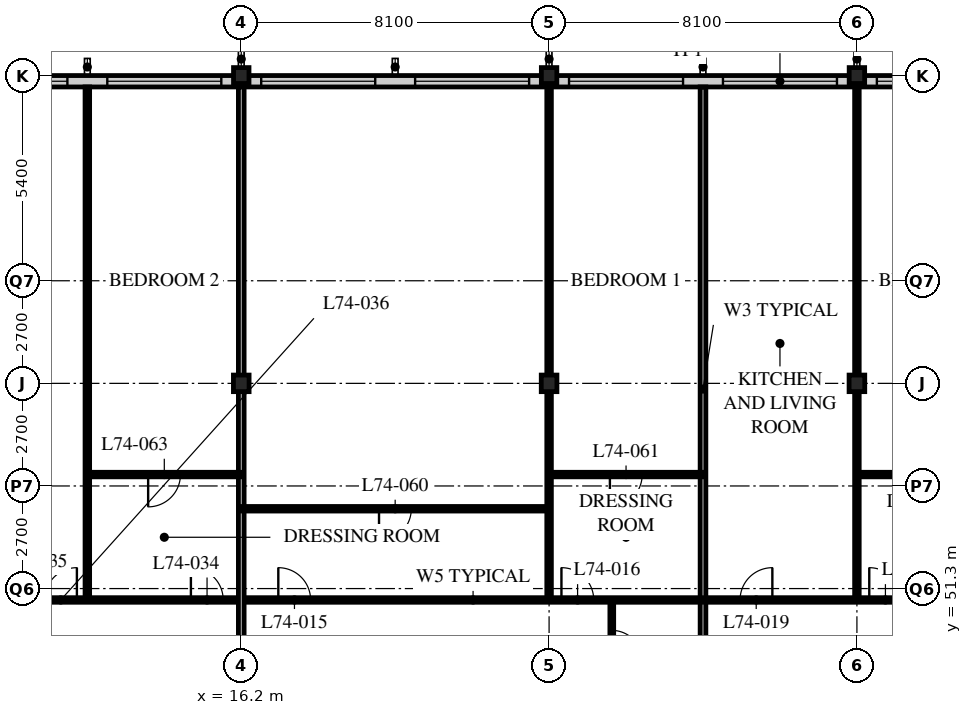
"""IFC4 building model, lengths in metres.
Left out: names, types, materials, properties, quantities, classifications, styles, units other than length and angle.
Written with IfcOpenShell. Run it as: python <this file> out.ifc"""

import sys

from ifc_helpers import new_model, si_unit, direction, frame, frame_2d, origin, origin_2d, place, context, subcontext, project, spatial, rectangle, i_section, extrude, element, fill, save


model = new_model("IFC4")
c1 = context("Model", 3, precision=1e-05, world=origin(), true_north=direction((0.0, 1.0)))
c2 = subcontext(c1, "Body", "Model", "MODEL_VIEW")
j1 = project(units=[si_unit("LENGTHUNIT", "METRE"), si_unit("PLANEANGLEUNIT", "RADIAN")], contexts=[c1])
p1 = place(None, origin())
s1 = spatial("IfcSite", under=j1, at=p1, CompositionType="ELEMENT")
p2 = place(p1, origin())
s2 = spatial("IfcBuilding", under=s1, at=p2, CompositionType="ELEMENT")
p3 = place(p2, frame((0.0, 0.0, 289.2)))
s3 = spatial("IfcBuildingStorey", under=s2, at=p3, CompositionType="ELEMENT", Elevation=289.2)
p4 = place(p3, frame((16.2, 56.7, 0.0), z_axis=(0.0, 0.0, 1.0), x_axis=(1.0, 0.0, 0.0)))
e1 = element("IfcColumn", 1, at=p4, inside=s3, PredefinedType="COLUMN", context=c2, shape_type="SweptSolid", body=[
    extrude(i_section(OverallWidth=0.412, OverallDepth=0.437, WebThickness=0.036, FlangeThickness=0.058, FilletRadius=0.015, at=origin_2d()), origin(), (0.0, 0.0, 1.0), 3.9),
])
p5 = place(p3, frame((16.2, 64.8, 0.0), z_axis=(0.0, 0.0, 1.0), x_axis=(1.0, 0.0, 0.0)))
e2 = element("IfcColumn", 2, at=p5, inside=s3, PredefinedType="COLUMN", context=c2, shape_type="SweptSolid", body=[
    extrude(i_section(OverallWidth=0.407, OverallDepth=0.419, WebThickness=0.031, FlangeThickness=0.049, FilletRadius=0.015, at=origin_2d()), origin(), (0.0, 0.0, 1.0), 3.9),
])
p6 = place(p3, frame((24.3, 56.7, 0.0), z_axis=(0.0, 0.0, 1.0), x_axis=(1.0, 0.0, 0.0)))
e3 = element("IfcColumn", 3, at=p6, inside=s3, PredefinedType="COLUMN", context=c2, shape_type="SweptSolid", body=[
    extrude(i_section(OverallWidth=0.412, OverallDepth=0.437, WebThickness=0.036, FlangeThickness=0.058, FilletRadius=0.015, at=origin_2d()), origin(), (0.0, 0.0, 1.0), 3.9),
])
p7 = place(p3, frame((24.3, 64.8, 0.0), z_axis=(0.0, 0.0, 1.0), x_axis=(1.0, 0.0, 0.0)))
e4 = element("IfcColumn", 4, at=p7, inside=s3, PredefinedType="COLUMN", context=c2, shape_type="SweptSolid", body=[
    extrude(i_section(OverallWidth=0.407, OverallDepth=0.419, WebThickness=0.031, FlangeThickness=0.049, FilletRadius=0.015, at=origin_2d()), origin(), (0.0, 0.0, 1.0), 3.9),
])
p8 = place(p3, frame((32.4, 56.7, 0.0), z_axis=(0.0, 0.0, 1.0), x_axis=(1.0, 0.0, 0.0)))
e5 = element("IfcColumn", 5, at=p8, inside=s3, PredefinedType="COLUMN", context=c2, shape_type="SweptSolid", body=[
    extrude(i_section(OverallWidth=0.412, OverallDepth=0.437, WebThickness=0.036, FlangeThickness=0.058, FilletRadius=0.015, at=origin_2d()), origin(), (0.0, 0.0, 1.0), 3.9),
])
p9 = place(p3, frame((32.4, 64.8, 0.0), z_axis=(0.0, 0.0, 1.0), x_axis=(1.0, 0.0, 0.0)))
e6 = element("IfcColumn", 6, at=p9, inside=s3, PredefinedType="COLUMN", context=c2, shape_type="SweptSolid", body=[
    extrude(i_section(OverallWidth=0.407, OverallDepth=0.419, WebThickness=0.031, FlangeThickness=0.049, FilletRadius=0.015, at=origin_2d()), origin(), (0.0, 0.0, 1.0), 3.9),
])
p10 = place(p3, frame((48.3, 64.65, 0.0), z_axis=(0.0, 0.0, 1.0), x_axis=(-1.0, 0.0, 0.0)))
e7 = element("IfcWall", 7, at=p10, inside=s3, PredefinedType="SOLIDWALL", context=c2, shape_type="SweptSolid", body=[
    extrude(rectangle(XDim=40.2, YDim=0.3, at=frame_2d((20.1, 0.0))), origin(), (0.0, 0.0, 1.0), 3.69),
])
p11 = place(p10, frame((0.225, 0.0, 0.6)))
e8 = element("IfcOpeningElement", 8, at=p11, cuts=e7, PredefinedType="OPENING", context=c2, shape_type="SweptSolid", body=[
    extrude(rectangle(XDim=3.0, YDim=2.4, at=frame_2d((1.5, 1.2))), frame((0.0, 0.16, 0.0), z_axis=(0.0, -1.0, 0.0), x_axis=(1.0, 0.0, 0.0)), (0.0, 0.0, 1.0), 0.32),
])
p12 = place(p10, frame((4.275, 0.0, 0.6)))
e9 = element("IfcOpeningElement", 9, at=p12, cuts=e7, PredefinedType="OPENING", context=c2, shape_type="SweptSolid", body=[
    extrude(rectangle(XDim=3.0, YDim=2.4, at=frame_2d((1.5, 1.2))), frame((0.0, 0.16, 0.0), z_axis=(0.0, -1.0, 0.0), x_axis=(1.0, 0.0, 0.0)), (0.0, 0.0, 1.0), 0.32),
])
p13 = place(p10, frame((8.325, 0.0, 0.6)))
e10 = element("IfcOpeningElement", 10, at=p13, cuts=e7, PredefinedType="OPENING", context=c2, shape_type="SweptSolid", body=[
    extrude(rectangle(XDim=3.0, YDim=2.4, at=frame_2d((1.5, 1.2))), frame((0.0, 0.16, 0.0), z_axis=(0.0, -1.0, 0.0), x_axis=(1.0, 0.0, 0.0)), (0.0, 0.0, 1.0), 0.32),
])
p14 = place(p10, frame((12.375, 0.0, 0.6)))
e11 = element("IfcOpeningElement", 11, at=p14, cuts=e7, PredefinedType="OPENING", context=c2, shape_type="SweptSolid", body=[
    extrude(rectangle(XDim=3.0, YDim=2.4, at=frame_2d((1.5, 1.2))), frame((0.0, 0.16, 0.0), z_axis=(0.0, -1.0, 0.0), x_axis=(1.0, 0.0, 0.0)), (0.0, 0.0, 1.0), 0.32),
])
p15 = place(p10, frame((16.425, 0.0, 0.6)))
e12 = element("IfcOpeningElement", 12, at=p15, cuts=e7, PredefinedType="OPENING", context=c2, shape_type="SweptSolid", body=[
    extrude(rectangle(XDim=3.0, YDim=2.4, at=frame_2d((1.5, 1.2))), frame((0.0, 0.16, 0.0), z_axis=(0.0, -1.0, 0.0), x_axis=(1.0, 0.0, 0.0)), (0.0, 0.0, 1.0), 0.32),
])
p16 = place(p10, frame((20.475, 0.0, 0.6)))
e13 = element("IfcOpeningElement", 13, at=p16, cuts=e7, PredefinedType="OPENING", context=c2, shape_type="SweptSolid", body=[
    extrude(rectangle(XDim=3.0, YDim=2.4, at=frame_2d((1.5, 1.2))), frame((0.0, 0.16, 0.0), z_axis=(0.0, -1.0, 0.0), x_axis=(1.0, 0.0, 0.0)), (0.0, 0.0, 1.0), 0.32),
])
p17 = place(p10, frame((24.525, 0.0, 0.6)))
e14 = element("IfcOpeningElement", 14, at=p17, cuts=e7, PredefinedType="OPENING", context=c2, shape_type="SweptSolid", body=[
    extrude(rectangle(XDim=3.0, YDim=2.4, at=frame_2d((1.5, 1.2))), frame((0.0, 0.16, 0.0), z_axis=(0.0, -1.0, 0.0), x_axis=(1.0, 0.0, 0.0)), (0.0, 0.0, 1.0), 0.32),
])
p18 = place(p10, frame((28.575, 0.0, 0.6)))
e15 = element("IfcOpeningElement", 15, at=p18, cuts=e7, PredefinedType="OPENING", context=c2, shape_type="SweptSolid", body=[
    extrude(rectangle(XDim=3.0, YDim=2.4, at=frame_2d((1.5, 1.2))), frame((0.0, 0.16, 0.0), z_axis=(0.0, -1.0, 0.0), x_axis=(1.0, 0.0, 0.0)), (0.0, 0.0, 1.0), 0.32),
])
p19 = place(p10, frame((32.625, 0.0, 0.6)))
e16 = element("IfcOpeningElement", 16, at=p19, cuts=e7, PredefinedType="OPENING", context=c2, shape_type="SweptSolid", body=[
    extrude(rectangle(XDim=3.0, YDim=2.4, at=frame_2d((1.5, 1.2))), frame((0.0, 0.16, 0.0), z_axis=(0.0, -1.0, 0.0), x_axis=(1.0, 0.0, 0.0)), (0.0, 0.0, 1.0), 0.32),
])
p20 = place(p10, frame((36.675, 0.0, 0.6)))
e17 = element("IfcOpeningElement", 17, at=p20, cuts=e7, PredefinedType="OPENING", context=c2, shape_type="SweptSolid", body=[
    extrude(rectangle(XDim=3.0, YDim=2.4, at=frame_2d((1.5, 1.2))), frame((0.0, 0.16, 0.0), z_axis=(0.0, -1.0, 0.0), x_axis=(1.0, 0.0, 0.0)), (0.0, 0.0, 1.0), 0.32),
])
p21 = place(p3, frame((25.95, 48.6, 0.0), z_axis=(0.0, 0.0, 1.0), x_axis=(0.0, 1.0, 0.0)))
e18 = element("IfcWall", 18, at=p21, inside=s3, PredefinedType="PARTITIONING", context=c2, shape_type="SweptSolid", body=[
    extrude(rectangle(XDim=2.4, YDim=0.1, at=frame_2d((1.2, 0.0))), origin(), (0.0, 0.0, 1.0), 3.69),
])
p22 = place(p21, frame((0.8, 0.0, 0.0)))
e19 = element("IfcOpeningElement", 19, at=p22, cuts=e18, PredefinedType="OPENING", context=c2, shape_type="SweptSolid", body=[
    extrude(rectangle(XDim=0.8, YDim=2.1, at=frame_2d((0.4, 1.05))), frame((0.0, 0.06, 0.0), z_axis=(0.0, -1.0, 0.0), x_axis=(1.0, 0.0, 0.0)), (0.0, 0.0, 1.0), 0.12),
])
p23 = place(p3, frame((24.3, 51.0, 0.0), z_axis=(0.0, 0.0, 1.0), x_axis=(0.0, 1.0, 0.0)))
e20 = element("IfcWall", 20, at=p23, inside=s3, PredefinedType="PARTITIONING", context=c2, shape_type="SweptSolid", body=[
    extrude(rectangle(XDim=13.5, YDim=0.12, at=frame_2d((6.75, 0.0))), origin(), (0.0, 0.0, 1.0), 3.078),
])
p24 = place(p3, frame((28.35, 48.6, 0.0), z_axis=(0.0, 0.0, 1.0), x_axis=(0.0, 1.0, 0.0)))
e21 = element("IfcWall", 21, at=p24, inside=s3, PredefinedType="PARTITIONING", context=c2, shape_type="SweptSolid", body=[
    extrude(rectangle(XDim=15.9, YDim=0.15, at=frame_2d((7.95, 0.0))), origin(), (0.0, 0.0, 1.0), 3.69),
])
p25 = place(p3, frame((32.4, 51.0, 0.0), z_axis=(0.0, 0.0, 1.0), x_axis=(0.0, 1.0, 0.0)))
e22 = element("IfcWall", 22, at=p25, inside=s3, PredefinedType="PARTITIONING", context=c2, shape_type="SweptSolid", body=[
    extrude(rectangle(XDim=13.5, YDim=0.12, at=frame_2d((6.75, 0.0))), origin(), (0.0, 0.0, 1.0), 3.078),
])
p26 = place(p3, frame((8.15, 51.0, 0.0), z_axis=(0.0, 0.0, 1.0), x_axis=(1.0, 0.0, 0.0)))
e23 = element("IfcWall", 23, at=p26, inside=s3, PredefinedType="PARTITIONING", context=c2, shape_type="SweptSolid", body=[
    extrude(rectangle(XDim=28.3, YDim=0.12, at=frame_2d((14.15, 0.0))), origin(), (0.0, 0.0, 1.0), 3.69),
])
p27 = place(p26, frame((9.025, 0.0, 0.0)))
e24 = element("IfcOpeningElement", 24, at=p27, cuts=e23, PredefinedType="OPENING", context=c2, shape_type="SweptSolid", body=[
    extrude(rectangle(XDim=0.85, YDim=2.1, at=frame_2d((0.425, 1.05))), frame((0.0, 0.07, 0.0), z_axis=(0.0, -1.0, 0.0), x_axis=(1.0, 0.0, 0.0)), (0.0, 0.0, 1.0), 0.14),
])
p28 = place(p26, frame((16.475, 0.0, 0.0)))
e25 = element("IfcOpeningElement", 25, at=p28, cuts=e23, PredefinedType="OPENING", context=c2, shape_type="SweptSolid", body=[
    extrude(rectangle(XDim=0.85, YDim=2.1, at=frame_2d((0.425, 1.05))), frame((0.0, 0.07, 0.0), z_axis=(0.0, -1.0, 0.0), x_axis=(1.0, 0.0, 0.0)), (0.0, 0.0, 1.0), 0.14),
])
p29 = place(p26, frame((21.175, 0.0, 0.0)))
e26 = element("IfcOpeningElement", 26, at=p29, cuts=e23, PredefinedType="OPENING", context=c2, shape_type="SweptSolid", body=[
    extrude(rectangle(XDim=0.85, YDim=2.1, at=frame_2d((0.425, 1.05))), frame((0.0, 0.07, 0.0), z_axis=(0.0, -1.0, 0.0), x_axis=(1.0, 0.0, 0.0)), (0.0, 0.0, 1.0), 0.14),
])
p30 = place(p26, frame((24.575, 0.0, 0.0)))
e27 = element("IfcOpeningElement", 27, at=p30, cuts=e23, PredefinedType="OPENING", context=c2, shape_type="SweptSolid", body=[
    extrude(rectangle(XDim=0.85, YDim=2.1, at=frame_2d((0.425, 1.05))), frame((0.0, 0.07, 0.0), z_axis=(0.0, -1.0, 0.0), x_axis=(1.0, 0.0, 0.0)), (0.0, 0.0, 1.0), 0.14),
])
p31 = place(p26, frame((6.725, 0.0, 0.0)))
e28 = element("IfcOpeningElement", 28, at=p31, cuts=e23, PredefinedType="OPENING", context=c2, shape_type="SweptSolid", body=[
    extrude(rectangle(XDim=0.85, YDim=2.1, at=frame_2d((0.425, 1.05))), frame((0.0, 0.07, 0.0), z_axis=(0.0, -1.0, 0.0), x_axis=(1.0, 0.0, 0.0)), (0.0, 0.0, 1.0), 0.14),
])
p32 = place(p26, frame((2.875, 0.0, 0.0)))
e29 = element("IfcOpeningElement", 29, at=p32, cuts=e23, PredefinedType="OPENING", context=c2, shape_type="SweptSolid", body=[
    extrude(rectangle(XDim=0.85, YDim=2.1, at=frame_2d((0.425, 1.05))), frame((0.0, 0.07, 0.0), z_axis=(0.0, -1.0, 0.0), x_axis=(1.0, 0.0, 0.0)), (0.0, 0.0, 1.0), 0.14),
])
p33 = place(p3, frame((12.15, 51.0, 0.0), z_axis=(0.0, 0.0, 1.0), x_axis=(0.0, 1.0, 0.0)))
e30 = element("IfcWall", 30, at=p33, inside=s3, PredefinedType="PARTITIONING", context=c2, shape_type="SweptSolid", body=[
    extrude(rectangle(XDim=13.5, YDim=0.12, at=frame_2d((6.75, 0.0))), origin(), (0.0, 0.0, 1.0), 3.69),
])
p34 = place(p3, frame((16.2, 48.6, 0.0), z_axis=(0.0, 0.0, 1.0), x_axis=(0.0, 1.0, 0.0)))
e31 = element("IfcWall", 31, at=p34, inside=s3, PredefinedType="PARTITIONING", context=c2, shape_type="SweptSolid", body=[
    extrude(rectangle(XDim=15.9, YDim=0.15, at=frame_2d((7.95, 0.0))), origin(), (0.0, 0.0, 1.0), 3.078),
])
p35 = place(p3, frame((16.2, 53.4, 0.0), z_axis=(0.0, 0.0, 1.0), x_axis=(1.0, 0.0, 0.0)))
e32 = element("IfcWall", 32, at=p35, inside=s3, PredefinedType="PARTITIONING", context=c2, shape_type="SweptSolid", body=[
    extrude(rectangle(XDim=8.1, YDim=0.12, at=frame_2d((4.05, 0.0))), origin(), (0.0, 0.0, 1.0), 3.69),
])
p36 = place(p35, frame((3.625, 0.0, 0.0)))
e33 = element("IfcOpeningElement", 33, at=p36, cuts=e32, PredefinedType="OPENING", context=c2, shape_type="SweptSolid", body=[
    extrude(rectangle(XDim=0.85, YDim=2.1, at=frame_2d((0.425, 1.05))), frame((0.0, 0.07, 0.0), z_axis=(0.0, -1.0, 0.0), x_axis=(1.0, 0.0, 0.0)), (0.0, 0.0, 1.0), 0.14),
])
p37 = place(p3, frame((24.3, 54.3, 0.0), z_axis=(0.0, 0.0, 1.0), x_axis=(1.0, 0.0, 0.0)))
e34 = element("IfcWall", 34, at=p37, inside=s3, PredefinedType="PARTITIONING", context=c2, shape_type="SweptSolid", body=[
    extrude(rectangle(XDim=4.05, YDim=0.12, at=frame_2d((2.025, 0.0))), origin(), (0.0, 0.0, 1.0), 3.69),
])
p38 = place(p37, frame((1.6, 0.0, 0.0)))
e35 = element("IfcOpeningElement", 35, at=p38, cuts=e34, PredefinedType="OPENING", context=c2, shape_type="SweptSolid", body=[
    extrude(rectangle(XDim=0.85, YDim=2.1, at=frame_2d((0.425, 1.05))), frame((0.0, 0.07, 0.0), z_axis=(0.0, -1.0, 0.0), x_axis=(1.0, 0.0, 0.0)), (0.0, 0.0, 1.0), 0.14),
])
p39 = place(p3, frame((32.4, 54.3, 0.0), z_axis=(0.0, 0.0, 1.0), x_axis=(1.0, 0.0, 0.0)))
e36 = element("IfcWall", 36, at=p39, inside=s3, PredefinedType="PARTITIONING", context=c2, shape_type="SweptSolid", body=[
    extrude(rectangle(XDim=4.05, YDim=0.12, at=frame_2d((2.025, 0.0))), origin(), (0.0, 0.0, 1.0), 3.69),
])
p40 = place(p39, frame((1.6, 0.0, 0.0)))
e37 = element("IfcOpeningElement", 37, at=p40, cuts=e36, PredefinedType="OPENING", context=c2, shape_type="SweptSolid", body=[
    extrude(rectangle(XDim=0.85, YDim=2.1, at=frame_2d((0.425, 1.05))), frame((0.0, 0.07, 0.0), z_axis=(0.0, -1.0, 0.0), x_axis=(1.0, 0.0, 0.0)), (0.0, 0.0, 1.0), 0.14),
])
p41 = place(p3, frame((12.15, 54.3, 0.0), z_axis=(0.0, 0.0, 1.0), x_axis=(1.0, 0.0, 0.0)))
e38 = element("IfcWall", 38, at=p41, inside=s3, PredefinedType="PARTITIONING", context=c2, shape_type="SweptSolid", body=[
    extrude(rectangle(XDim=4.05, YDim=0.12, at=frame_2d((2.025, 0.0))), origin(), (0.0, 0.0, 1.0), 3.69),
])
p42 = place(p41, frame((1.6, 0.0, 0.0)))
e39 = element("IfcOpeningElement", 39, at=p42, cuts=e38, PredefinedType="OPENING", context=c2, shape_type="SweptSolid", body=[
    extrude(rectangle(XDim=0.85, YDim=2.1, at=frame_2d((0.425, 1.05))), frame((0.0, 0.07, 0.0), z_axis=(0.0, -1.0, 0.0), x_axis=(1.0, 0.0, 0.0)), (0.0, 0.0, 1.0), 0.14),
])
p43 = place(p14, origin())
e40 = element("IfcWindow", 40, at=p43, inside=s3, PartitioningType="SINGLE_PANEL", PredefinedType="WINDOW", context=c2, shape_type="SweptSolid", body=[
    extrude(rectangle(XDim=3.0, YDim=2.4, at=frame_2d((1.5, 1.2))), frame((0.0, 0.03, 0.0), z_axis=(0.0, -1.0, 0.0), x_axis=(1.0, 0.0, 0.0)), (0.0, 0.0, 1.0), 0.06),
])
fill(e11, e40)
p44 = place(p15, origin())
e41 = element("IfcWindow", 41, at=p44, inside=s3, PartitioningType="SINGLE_PANEL", PredefinedType="WINDOW", context=c2, shape_type="SweptSolid", body=[
    extrude(rectangle(XDim=3.0, YDim=2.4, at=frame_2d((1.5, 1.2))), frame((0.0, 0.03, 0.0), z_axis=(0.0, -1.0, 0.0), x_axis=(1.0, 0.0, 0.0)), (0.0, 0.0, 1.0), 0.06),
])
fill(e12, e41)
p45 = place(p16, origin())
e42 = element("IfcWindow", 42, at=p45, inside=s3, PartitioningType="SINGLE_PANEL", PredefinedType="WINDOW", context=c2, shape_type="SweptSolid", body=[
    extrude(rectangle(XDim=3.0, YDim=2.4, at=frame_2d((1.5, 1.2))), frame((0.0, 0.03, 0.0), z_axis=(0.0, -1.0, 0.0), x_axis=(1.0, 0.0, 0.0)), (0.0, 0.0, 1.0), 0.06),
])
fill(e13, e42)
p46 = place(p17, origin())
e43 = element("IfcWindow", 43, at=p46, inside=s3, PartitioningType="SINGLE_PANEL", PredefinedType="WINDOW", context=c2, shape_type="SweptSolid", body=[
    extrude(rectangle(XDim=3.0, YDim=2.4, at=frame_2d((1.5, 1.2))), frame((0.0, 0.03, 0.0), z_axis=(0.0, -1.0, 0.0), x_axis=(1.0, 0.0, 0.0)), (0.0, 0.0, 1.0), 0.06),
])
fill(e14, e43)
p47 = place(p18, origin())
e44 = element("IfcWindow", 44, at=p47, inside=s3, PartitioningType="SINGLE_PANEL", PredefinedType="WINDOW", context=c2, shape_type="SweptSolid", body=[
    extrude(rectangle(XDim=3.0, YDim=2.4, at=frame_2d((1.5, 1.2))), frame((0.0, 0.03, 0.0), z_axis=(0.0, -1.0, 0.0), x_axis=(1.0, 0.0, 0.0)), (0.0, 0.0, 1.0), 0.06),
])
fill(e15, e44)
p48 = place(p19, origin())
e45 = element("IfcWindow", 45, at=p48, inside=s3, PartitioningType="SINGLE_PANEL", PredefinedType="WINDOW", context=c2, shape_type="SweptSolid", body=[
    extrude(rectangle(XDim=3.0, YDim=2.4, at=frame_2d((1.5, 1.2))), frame((0.0, 0.03, 0.0), z_axis=(0.0, -1.0, 0.0), x_axis=(1.0, 0.0, 0.0)), (0.0, 0.0, 1.0), 0.06),
])
fill(e16, e45)
p49 = place(p20, origin())
e46 = element("IfcWindow", 46, at=p49, inside=s3, PartitioningType="SINGLE_PANEL", PredefinedType="WINDOW", context=c2, shape_type="SweptSolid", body=[
    extrude(rectangle(XDim=3.0, YDim=2.4, at=frame_2d((1.5, 1.2))), frame((0.0, 0.03, 0.0), z_axis=(0.0, -1.0, 0.0), x_axis=(1.0, 0.0, 0.0)), (0.0, 0.0, 1.0), 0.06),
])
fill(e17, e46)
p50 = place(p22, origin())
e47 = element("IfcDoor", 47, at=p50, inside=s3, OperationType="SINGLE_SWING_RIGHT", PredefinedType="DOOR", context=c2, shape_type="SweptSolid", body=[
    extrude(rectangle(XDim=0.8, YDim=2.1, at=frame_2d((0.4, 1.05))), frame((0.0, 0.025, 0.0), z_axis=(0.0, -1.0, 0.0), x_axis=(1.0, 0.0, 0.0)), (0.0, 0.0, 1.0), 0.05),
])
fill(e19, e47)
p51 = place(p27, origin())
e48 = element("IfcDoor", 48, at=p51, inside=s3, OperationType="SINGLE_SWING_LEFT", PredefinedType="DOOR", context=c2, shape_type="SweptSolid", body=[
    extrude(rectangle(XDim=0.85, YDim=2.1, at=frame_2d((0.425, 1.05))), frame((0.0, 0.025, 0.0), z_axis=(0.0, -1.0, 0.0), x_axis=(1.0, 0.0, 0.0)), (0.0, 0.0, 1.0), 0.05),
])
fill(e24, e48)
p52 = place(p28, origin())
e49 = element("IfcDoor", 49, at=p52, inside=s3, OperationType="SINGLE_SWING_LEFT", PredefinedType="DOOR", context=c2, shape_type="SweptSolid", body=[
    extrude(rectangle(XDim=0.85, YDim=2.1, at=frame_2d((0.425, 1.05))), frame((0.0, 0.025, 0.0), z_axis=(0.0, -1.0, 0.0), x_axis=(1.0, 0.0, 0.0)), (0.0, 0.0, 1.0), 0.05),
])
fill(e25, e49)
p53 = place(p29, origin())
e50 = element("IfcDoor", 50, at=p53, inside=s3, OperationType="SINGLE_SWING_RIGHT", PredefinedType="DOOR", context=c2, shape_type="SweptSolid", body=[
    extrude(rectangle(XDim=0.85, YDim=2.1, at=frame_2d((0.425, 1.05))), frame((0.0, 0.025, 0.0), z_axis=(0.0, -1.0, 0.0), x_axis=(1.0, 0.0, 0.0)), (0.0, 0.0, 1.0), 0.05),
])
fill(e26, e50)
p54 = place(p30, origin())
e51 = element("IfcDoor", 51, at=p54, inside=s3, OperationType="SINGLE_SWING_LEFT", PredefinedType="DOOR", context=c2, shape_type="SweptSolid", body=[
    extrude(rectangle(XDim=0.85, YDim=2.1, at=frame_2d((0.425, 1.05))), frame((0.0, 0.025, 0.0), z_axis=(0.0, -1.0, 0.0), x_axis=(1.0, 0.0, 0.0)), (0.0, 0.0, 1.0), 0.05),
])
fill(e27, e51)
p55 = place(p31, origin())
e52 = element("IfcDoor", 52, at=p55, inside=s3, OperationType="SINGLE_SWING_LEFT", PredefinedType="DOOR", context=c2, shape_type="SweptSolid", body=[
    extrude(rectangle(XDim=0.85, YDim=2.1, at=frame_2d((0.425, 1.05))), frame((0.0, 0.025, 0.0), z_axis=(0.0, -1.0, 0.0), x_axis=(1.0, 0.0, 0.0)), (0.0, 0.0, 1.0), 0.05),
])
fill(e28, e52)
p56 = place(p32, origin())
e53 = element("IfcDoor", 53, at=p56, inside=s3, OperationType="SINGLE_SWING_RIGHT", PredefinedType="DOOR", context=c2, shape_type="SweptSolid", body=[
    extrude(rectangle(XDim=0.85, YDim=2.1, at=frame_2d((0.425, 1.05))), frame((0.0, 0.025, 0.0), z_axis=(0.0, -1.0, 0.0), x_axis=(1.0, 0.0, 0.0)), (0.0, 0.0, 1.0), 0.05),
])
fill(e29, e53)
p57 = place(p36, origin())
e54 = element("IfcDoor", 54, at=p57, inside=s3, OperationType="SINGLE_SWING_RIGHT", PredefinedType="DOOR", context=c2, shape_type="SweptSolid", body=[
    extrude(rectangle(XDim=0.85, YDim=2.1, at=frame_2d((0.425, 1.05))), frame((0.0, 0.025, 0.0), z_axis=(0.0, -1.0, 0.0), x_axis=(1.0, 0.0, 0.0)), (0.0, 0.0, 1.0), 0.05),
])
fill(e33, e54)
p58 = place(p38, origin())
e55 = element("IfcDoor", 55, at=p58, inside=s3, OperationType="SINGLE_SWING_RIGHT", PredefinedType="DOOR", context=c2, shape_type="SweptSolid", body=[
    extrude(rectangle(XDim=0.85, YDim=2.1, at=frame_2d((0.425, 1.05))), frame((0.0, 0.025, 0.0), z_axis=(0.0, -1.0, 0.0), x_axis=(1.0, 0.0, 0.0)), (0.0, 0.0, 1.0), 0.05),
])
fill(e35, e55)
p59 = place(p42, origin())
e56 = element("IfcDoor", 56, at=p59, inside=s3, OperationType="SINGLE_SWING_RIGHT", PredefinedType="DOOR", context=c2, shape_type="SweptSolid", body=[
    extrude(rectangle(XDim=0.85, YDim=2.1, at=frame_2d((0.425, 1.05))), frame((0.0, 0.025, 0.0), z_axis=(0.0, -1.0, 0.0), x_axis=(1.0, 0.0, 0.0)), (0.0, 0.0, 1.0), 0.05),
])
fill(e39, e56)
save(model, sys.argv[1])
